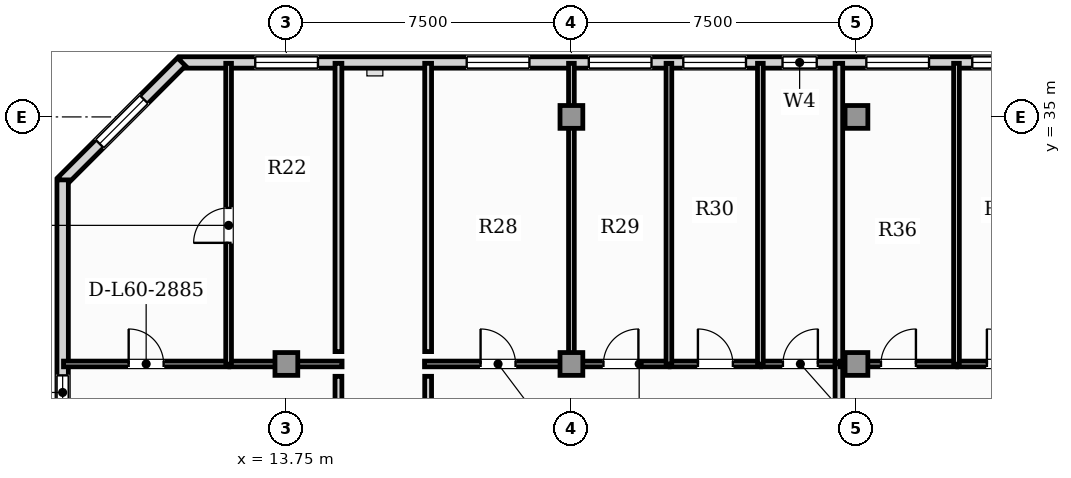
"""IFC4 building model, lengths in metres.
Left out: names, types, materials, properties, quantities, classifications, styles, units other than length and angle.
Written with IfcOpenShell. Run it as: python <this file> out.ifc"""

import sys

from ifc_helpers import new_model, si_unit, direction, frame, frame_2d, origin, origin_2d, place, context, subcontext, project, spatial, rectangle, extrude, element, fill, save


model = new_model("IFC4")
c1 = context("Model", 3, precision=1e-05, world=origin(), true_north=direction((0.0, 1.0)))
c2 = subcontext(c1, "Body", "Model", "MODEL_VIEW")
j1 = project(units=[si_unit("LENGTHUNIT", "METRE"), si_unit("PLANEANGLEUNIT", "RADIAN")], contexts=[c1])
p1 = place(None, origin())
s1 = spatial("IfcSite", under=j1, at=p1, CompositionType="ELEMENT")
p2 = place(p1, origin())
s2 = spatial("IfcBuilding", under=s1, at=p2, CompositionType="ELEMENT")
p3 = place(p2, frame((0.0, 0.0, 242.65)))
s3 = spatial("IfcBuildingStorey", under=s2, at=p3, CompositionType="ELEMENT", Elevation=242.65)
for number, where, z_axis, x_axis in (
    (1, (13.75, 28.5, 0.0), (0.0, 0.0, 1.0), (1.0, 0.0, 0.0)),
    (2, (21.25, 28.5, 0.0), (0.0, 0.0, 1.0), (1.0, 0.0, 0.0)),
    (3, (28.75, 28.5, 0.0), (0.0, 0.0, 1.0), (1.0, 0.0, 0.0)),
    (4, (21.25, 35.0, 0.0), (0.0, 0.0, 1.0), (1.0, 0.0, 0.0)),
    (5, (28.75, 35.0, 0.0), (0.0, 0.0, 1.0), (1.0, 0.0, 0.0)),
):
    element("IfcColumn", number, at=place(p3, frame(where, z_axis=z_axis, x_axis=x_axis)), inside=s3, PredefinedType="COLUMN", context=c2, shape_type="SweptSolid", body=[
        extrude(rectangle(XDim=0.6, YDim=0.6, at=origin_2d()), origin(), (0.0, 0.0, 1.0), 3.85),
    ])
p4 = place(p3, frame((46.547, 36.433, 0.0), z_axis=(0.0, 0.0, 1.0), x_axis=(-1.0, 0.0, 0.0)))
e6 = element("IfcWall", 6, at=p4, inside=s3, PredefinedType="SOLIDWALL", context=c2, shape_type="SweptSolid", body=[
    extrude(rectangle(XDim=35.593, YDim=0.3, at=frame_2d((17.797, 0.0))), origin(), (0.0, 0.0, 1.0), 3.5),
])
p5 = place(p4, frame((31.966, 0.0, 0.88)))
e7 = element("IfcOpeningElement", 7, at=p5, cuts=e6, PredefinedType="OPENING", context=c2, shape_type="SweptSolid", body=[
    extrude(rectangle(XDim=1.65, YDim=2.0, at=frame_2d((0.825, 1.0))), frame((0.0, 0.16, 0.0), z_axis=(0.0, -1.0, 0.0), x_axis=(1.0, 0.0, 0.0)), (0.0, 0.0, 1.0), 0.32),
])
p6 = place(p4, frame((26.402, 0.0, 0.88)))
e8 = element("IfcOpeningElement", 8, at=p6, cuts=e6, PredefinedType="OPENING", context=c2, shape_type="SweptSolid", body=[
    extrude(rectangle(XDim=1.65, YDim=2.0, at=frame_2d((0.825, 1.0))), frame((0.0, 0.16, 0.0), z_axis=(0.0, -1.0, 0.0), x_axis=(1.0, 0.0, 0.0)), (0.0, 0.0, 1.0), 0.32),
])
p7 = place(p4, frame((23.189, 0.0, 0.88)))
e9 = element("IfcOpeningElement", 9, at=p7, cuts=e6, PredefinedType="OPENING", context=c2, shape_type="SweptSolid", body=[
    extrude(rectangle(XDim=1.65, YDim=2.0, at=frame_2d((0.825, 1.0))), frame((0.0, 0.16, 0.0), z_axis=(0.0, -1.0, 0.0), x_axis=(1.0, 0.0, 0.0)), (0.0, 0.0, 1.0), 0.32),
])
p8 = place(p4, frame((20.703, 0.0, 0.88)))
e10 = element("IfcOpeningElement", 10, at=p8, cuts=e6, PredefinedType="OPENING", context=c2, shape_type="SweptSolid", body=[
    extrude(rectangle(XDim=1.65, YDim=2.0, at=frame_2d((0.825, 1.0))), frame((0.0, 0.16, 0.0), z_axis=(0.0, -1.0, 0.0), x_axis=(1.0, 0.0, 0.0)), (0.0, 0.0, 1.0), 0.32),
])
p9 = place(p4, frame((18.842, 0.0, 0.95)))
e11 = element("IfcOpeningElement", 11, at=p9, cuts=e6, PredefinedType="OPENING", context=c2, shape_type="SweptSolid", body=[
    extrude(rectangle(XDim=0.9, YDim=1.5, at=frame_2d((0.45, 0.75))), frame((0.0, 0.16, 0.0), z_axis=(0.0, -1.0, 0.0), x_axis=(1.0, 0.0, 0.0)), (0.0, 0.0, 1.0), 0.32),
])
p10 = place(p4, frame((15.887, 0.0, 0.88)))
e12 = element("IfcOpeningElement", 12, at=p10, cuts=e6, PredefinedType="OPENING", context=c2, shape_type="SweptSolid", body=[
    extrude(rectangle(XDim=1.65, YDim=2.0, at=frame_2d((0.825, 1.0))), frame((0.0, 0.16, 0.0), z_axis=(0.0, -1.0, 0.0), x_axis=(1.0, 0.0, 0.0)), (0.0, 0.0, 1.0), 0.32),
])
p11 = place(p4, frame((13.1, 0.0, 0.88)))
e13 = element("IfcOpeningElement", 13, at=p11, cuts=e6, PredefinedType="OPENING", context=c2, shape_type="SweptSolid", body=[
    extrude(rectangle(XDim=1.65, YDim=2.0, at=frame_2d((0.825, 1.0))), frame((0.0, 0.16, 0.0), z_axis=(0.0, -1.0, 0.0), x_axis=(1.0, 0.0, 0.0)), (0.0, 0.0, 1.0), 0.32),
])
p12 = place(p4, frame((10.666, 0.0, 0.88)))
e14 = element("IfcOpeningElement", 14, at=p12, cuts=e6, PredefinedType="OPENING", context=c2, shape_type="SweptSolid", body=[
    extrude(rectangle(XDim=1.65, YDim=2.0, at=frame_2d((0.825, 1.0))), frame((0.0, 0.16, 0.0), z_axis=(0.0, -1.0, 0.0), x_axis=(1.0, 0.0, 0.0)), (0.0, 0.0, 1.0), 0.32),
])
p13 = place(p4, frame((8.185, 0.0, 0.88)))
e15 = element("IfcOpeningElement", 15, at=p13, cuts=e6, PredefinedType="OPENING", context=c2, shape_type="SweptSolid", body=[
    extrude(rectangle(XDim=1.65, YDim=2.0, at=frame_2d((0.825, 1.0))), frame((0.0, 0.16, 0.0), z_axis=(0.0, -1.0, 0.0), x_axis=(1.0, 0.0, 0.0)), (0.0, 0.0, 1.0), 0.32),
])
p14 = place(p4, frame((5.405, 0.0, 0.88)))
e16 = element("IfcOpeningElement", 16, at=p14, cuts=e6, PredefinedType="OPENING", context=c2, shape_type="SweptSolid", body=[
    extrude(rectangle(XDim=1.65, YDim=2.0, at=frame_2d((0.825, 1.0))), frame((0.0, 0.16, 0.0), z_axis=(0.0, -1.0, 0.0), x_axis=(1.0, 0.0, 0.0)), (0.0, 0.0, 1.0), 0.32),
])
p15 = place(p4, frame((2.714, 0.0, 0.88)))
e17 = element("IfcOpeningElement", 17, at=p15, cuts=e6, PredefinedType="OPENING", context=c2, shape_type="SweptSolid", body=[
    extrude(rectangle(XDim=1.65, YDim=2.0, at=frame_2d((0.825, 1.0))), frame((0.0, 0.16, 0.0), z_axis=(0.0, -1.0, 0.0), x_axis=(1.0, 0.0, 0.0)), (0.0, 0.0, 1.0), 0.32),
])
p16 = place(p4, frame((0.78, 0.0, 0.95)))
e18 = element("IfcOpeningElement", 18, at=p16, cuts=e6, PredefinedType="OPENING", context=c2, shape_type="SweptSolid", body=[
    extrude(rectangle(XDim=0.9, YDim=1.5, at=frame_2d((0.45, 0.75))), frame((0.0, 0.16, 0.0), z_axis=(0.0, -1.0, 0.0), x_axis=(1.0, 0.0, 0.0)), (0.0, 0.0, 1.0), 0.32),
])
p17 = place(p3, frame((10.991, 36.449, 0.0), z_axis=(0.0, 0.0, 1.0), x_axis=(-0.707134240044, -0.707079321262, 0.0)))
e19 = element("IfcWall", 19, at=p17, inside=s3, PredefinedType="SOLIDWALL", context=c2, shape_type="SweptSolid", body=[
    extrude(rectangle(XDim=4.446, YDim=0.3, at=frame_2d((2.223, 0.0))), origin(), (0.0, 0.0, 1.0), 3.5),
])
p18 = place(p17, frame((1.398, 0.0, 0.88)))
e20 = element("IfcOpeningElement", 20, at=p18, cuts=e19, PredefinedType="OPENING", context=c2, shape_type="SweptSolid", body=[
    extrude(rectangle(XDim=1.65, YDim=2.0, at=frame_2d((0.825, 1.0))), frame((0.0, 0.16, 0.0), z_axis=(0.0, -1.0, 0.0), x_axis=(1.0, 0.0, 0.0)), (0.0, 0.0, 1.0), 0.32),
])
p19 = place(p3, frame((7.863, 33.343, 0.0), z_axis=(0.0, 0.0, 1.0), x_axis=(0.0, -1.0, 0.0)))
e21 = element("IfcWall", 21, at=p19, inside=s3, PredefinedType="SOLIDWALL", context=c2, shape_type="SweptSolid", body=[
    extrude(rectangle(XDim=30.103, YDim=0.3, at=frame_2d((15.052, 0.0))), origin(), (0.0, 0.0, 1.0), 3.5),
])
p20 = place(p19, frame((24.044, 0.0, 0.85)))
e22 = element("IfcOpeningElement", 22, at=p20, cuts=e21, PredefinedType="OPENING", context=c2, shape_type="SweptSolid", body=[
    extrude(rectangle(XDim=2.4, YDim=2.0, at=frame_2d((1.2, 1.0))), frame((0.0, 0.16, 0.0), z_axis=(0.0, -1.0, 0.0), x_axis=(1.0, 0.0, 0.0)), (0.0, 0.0, 1.0), 0.32),
])
p21 = place(p19, frame((5.143, 0.0, 0.95)))
e23 = element("IfcOpeningElement", 23, at=p21, cuts=e21, PredefinedType="OPENING", context=c2, shape_type="SweptSolid", body=[
    extrude(rectangle(XDim=0.9, YDim=1.5, at=frame_2d((0.45, 0.75))), frame((0.0, 0.16, 0.0), z_axis=(0.0, -1.0, 0.0), x_axis=(1.0, 0.0, 0.0)), (0.0, 0.0, 1.0), 0.32),
])
p22 = place(p19, frame((10.185, 0.0, 0.88)))
e24 = element("IfcOpeningElement", 24, at=p22, cuts=e21, PredefinedType="OPENING", context=c2, shape_type="SweptSolid", body=[
    extrude(rectangle(XDim=1.65, YDim=2.0, at=frame_2d((0.825, 1.0))), frame((0.0, 0.16, 0.0), z_axis=(0.0, -1.0, 0.0), x_axis=(1.0, 0.0, 0.0)), (0.0, 0.0, 1.0), 0.32),
])
p23 = place(p3, frame((7.886, 28.5, 0.0), z_axis=(0.0, 0.0, 1.0), x_axis=(1.0, 0.0, 0.0)))
e25 = element("IfcWall", 25, at=p23, inside=s3, PredefinedType="PARTITIONING", context=c2, shape_type="SweptSolid", body=[
    extrude(rectangle(XDim=4.349, YDim=0.15, at=frame_2d((2.175, 0.0))), origin(), (0.0, 0.0, 1.0), 3.5),
])
p24 = place(p23, frame((1.715, 0.0, 0.0)))
e26 = element("IfcOpeningElement", 26, at=p24, cuts=e25, PredefinedType="OPENING", context=c2, shape_type="SweptSolid", body=[
    extrude(rectangle(XDim=0.92, YDim=2.1, at=frame_2d((0.46, 1.05))), frame((0.0, 0.085, 0.0), z_axis=(0.0, -1.0, 0.0), x_axis=(1.0, 0.0, 0.0)), (0.0, 0.0, 1.0), 0.17),
])
p25 = place(p3, frame((12.265, 28.5, 0.0), z_axis=(0.0, 0.0, 1.0), x_axis=(1.0, 0.0, 0.0)))
e27 = element("IfcWall", 27, at=p25, inside=s3, PredefinedType="PARTITIONING", context=c2, shape_type="SweptSolid", body=[
    extrude(rectangle(XDim=2.95, YDim=0.15, at=frame_2d((1.475, 0.0))), origin(), (0.0, 0.0, 1.0), 2.956),
])
p26 = place(p3, frame((12.23, 28.495, 0.0), z_axis=(0.0, 0.0, 1.0), x_axis=(0.0, 1.0, 0.0)))
e28 = element("IfcWall", 28, at=p26, inside=s3, PredefinedType="PARTITIONING", context=c2, shape_type="SweptSolid", body=[
    extrude(rectangle(XDim=7.916, YDim=0.15, at=frame_2d((3.958, 0.0))), origin(), (0.0, 0.0, 1.0), 3.5),
])
p27 = place(p26, frame((3.191, 0.0, 0.0)))
e29 = element("IfcOpeningElement", 29, at=p27, cuts=e28, PredefinedType="OPENING", context=c2, shape_type="SweptSolid", body=[
    extrude(rectangle(XDim=0.92, YDim=2.1, at=frame_2d((0.46, 1.05))), frame((0.0, 0.085, 0.0), z_axis=(0.0, -1.0, 0.0), x_axis=(1.0, 0.0, 0.0)), (0.0, 0.0, 1.0), 0.17),
])
p28 = place(p3, frame((17.385, 28.5, 0.0), z_axis=(0.0, 0.0, 1.0), x_axis=(1.0, 0.0, 0.0)))
e30 = element("IfcWall", 30, at=p28, inside=s3, PredefinedType="PARTITIONING", context=c2, shape_type="SweptSolid", body=[
    extrude(rectangle(XDim=3.87, YDim=0.15, at=frame_2d((1.935, 0.0))), origin(), (0.0, 0.0, 1.0), 2.956),
])
p29 = place(p28, frame((1.475, 0.0, 0.0)))
e31 = element("IfcOpeningElement", 31, at=p29, cuts=e30, PredefinedType="OPENING", context=c2, shape_type="SweptSolid", body=[
    extrude(rectangle(XDim=0.92, YDim=2.1, at=frame_2d((0.46, 1.05))), frame((0.0, 0.085, 0.0), z_axis=(0.0, -1.0, 0.0), x_axis=(1.0, 0.0, 0.0)), (0.0, 0.0, 1.0), 0.17),
])
p30 = place(p3, frame((21.285, 28.5, 0.0), z_axis=(0.0, 0.0, 1.0), x_axis=(1.0, 0.0, 0.0)))
e32 = element("IfcWall", 32, at=p30, inside=s3, PredefinedType="PARTITIONING", context=c2, shape_type="SweptSolid", body=[
    extrude(rectangle(XDim=2.536, YDim=0.15, at=frame_2d((1.268, 0.0))), origin(), (0.0, 0.0, 1.0), 2.956),
])
p31 = place(p30, frame((0.808, 0.0, 0.0)))
e33 = element("IfcOpeningElement", 33, at=p31, cuts=e32, PredefinedType="OPENING", context=c2, shape_type="SweptSolid", body=[
    extrude(rectangle(XDim=0.92, YDim=2.1, at=frame_2d((0.46, 1.05))), frame((0.0, 0.085, 0.0), z_axis=(0.0, -1.0, 0.0), x_axis=(1.0, 0.0, 0.0)), (0.0, 0.0, 1.0), 0.17),
])
p32 = place(p3, frame((23.851, 28.5, 0.0), z_axis=(0.0, 0.0, 1.0), x_axis=(1.0, 0.0, 0.0)))
e34 = element("IfcWall", 34, at=p32, inside=s3, PredefinedType="PARTITIONING", context=c2, shape_type="SweptSolid", body=[
    extrude(rectangle(XDim=2.376, YDim=0.15, at=frame_2d((1.188, 0.0))), origin(), (0.0, 0.0, 1.0), 2.956),
])
p33 = place(p32, frame((0.728, 0.0, 0.0)))
e35 = element("IfcOpeningElement", 35, at=p33, cuts=e34, PredefinedType="OPENING", context=c2, shape_type="SweptSolid", body=[
    extrude(rectangle(XDim=0.92, YDim=2.1, at=frame_2d((0.46, 1.05))), frame((0.0, 0.085, 0.0), z_axis=(0.0, -1.0, 0.0), x_axis=(1.0, 0.0, 0.0)), (0.0, 0.0, 1.0), 0.17),
])
p34 = place(p3, frame((26.257, 28.5, 0.0), z_axis=(0.0, 0.0, 1.0), x_axis=(1.0, 0.0, 0.0)))
e36 = element("IfcWall", 36, at=p34, inside=s3, PredefinedType="PARTITIONING", context=c2, shape_type="SweptSolid", body=[
    extrude(rectangle(XDim=2.036, YDim=0.15, at=frame_2d((1.018, 0.0))), origin(), (0.0, 0.0, 1.0), 2.956),
])
p35 = place(p34, frame((0.558, 0.0, 0.0)))
e37 = element("IfcOpeningElement", 37, at=p35, cuts=e36, PredefinedType="OPENING", context=c2, shape_type="SweptSolid", body=[
    extrude(rectangle(XDim=0.92, YDim=2.1, at=frame_2d((0.46, 1.05))), frame((0.0, 0.085, 0.0), z_axis=(0.0, -1.0, 0.0), x_axis=(1.0, 0.0, 0.0)), (0.0, 0.0, 1.0), 0.17),
])
p36 = place(p3, frame((28.288, 26.995, 0.0), z_axis=(0.0, 0.0, 1.0), x_axis=(0.0, 1.0, 0.0)))
e38 = element("IfcWall", 38, at=p36, inside=s3, PredefinedType="PARTITIONING", context=c2, shape_type="SweptSolid", body=[
    extrude(rectangle(XDim=1.51, YDim=0.2, at=frame_2d((0.755, 0.0))), origin(), (0.0, 0.0, 1.0), 3.5),
])
for number, where, z_axis, x_axis in (
    (39, (21.25, 28.495, 0.0), (0.0, 0.0, 1.0), (0.0, 1.0, 0.0)),
    (40, (23.815, 28.495, 0.0), (0.0, 0.0, 1.0), (0.0, 1.0, 0.0)),
    (41, (26.222, 28.495, 0.0), (0.0, 0.0, 1.0), (0.0, 1.0, 0.0)),
):
    element("IfcWall", number, at=place(p3, frame(where, z_axis=z_axis, x_axis=x_axis)), inside=s3, PredefinedType="PARTITIONING", context=c2, shape_type="SweptSolid", body=[
        extrude(rectangle(XDim=7.916, YDim=0.15, at=frame_2d((3.958, 0.0))), origin(), (0.0, 0.0, 1.0), 3.5),
    ])
p37 = place(p3, frame((28.288, 28.535, 0.0), z_axis=(0.0, 0.0, 1.0), x_axis=(0.0, 1.0, 0.0)))
e42 = element("IfcWall", 42, at=p37, inside=s3, PredefinedType="PARTITIONING", context=c2, shape_type="SweptSolid", body=[
    extrude(rectangle(XDim=7.876, YDim=0.2, at=frame_2d((3.938, 0.0))), origin(), (0.0, 0.0, 1.0), 3.5),
])
p38 = place(p3, frame((28.323, 28.5, 0.0), z_axis=(0.0, 0.0, 1.0), x_axis=(1.0, 0.0, 0.0)))
e43 = element("IfcWall", 43, at=p38, inside=s3, PredefinedType="PARTITIONING", context=c2, shape_type="SweptSolid", body=[
    extrude(rectangle(XDim=3.064, YDim=0.15, at=frame_2d((1.532, 0.0))), origin(), (0.0, 0.0, 1.0), 2.956),
])
p39 = place(p38, frame((1.072, 0.0, 0.0)))
e44 = element("IfcOpeningElement", 44, at=p39, cuts=e43, PredefinedType="OPENING", context=c2, shape_type="SweptSolid", body=[
    extrude(rectangle(XDim=0.92, YDim=2.1, at=frame_2d((0.46, 1.05))), frame((0.0, 0.085, 0.0), z_axis=(0.0, -1.0, 0.0), x_axis=(1.0, 0.0, 0.0)), (0.0, 0.0, 1.0), 0.17),
])
p40 = place(p3, frame((31.417, 28.5, 0.0), z_axis=(0.0, 0.0, 1.0), x_axis=(1.0, 0.0, 0.0)))
e45 = element("IfcWall", 45, at=p40, inside=s3, PredefinedType="PARTITIONING", context=c2, shape_type="SweptSolid", body=[
    extrude(rectangle(XDim=2.45, YDim=0.15, at=frame_2d((1.225, 0.0))), origin(), (0.0, 0.0, 1.0), 2.956),
])
p41 = place(p40, frame((0.765, 0.0, 0.0)))
e46 = element("IfcOpeningElement", 46, at=p41, cuts=e45, PredefinedType="OPENING", context=c2, shape_type="SweptSolid", body=[
    extrude(rectangle(XDim=0.92, YDim=2.1, at=frame_2d((0.46, 1.05))), frame((0.0, 0.085, 0.0), z_axis=(0.0, -1.0, 0.0), x_axis=(1.0, 0.0, 0.0)), (0.0, 0.0, 1.0), 0.17),
])
p42 = place(p3, frame((31.382, 28.495, 0.0), z_axis=(0.0, 0.0, 1.0), x_axis=(0.0, 1.0, 0.0)))
e47 = element("IfcWall", 47, at=p42, inside=s3, PredefinedType="PARTITIONING", context=c2, shape_type="SweptSolid", body=[
    extrude(rectangle(XDim=7.916, YDim=0.15, at=frame_2d((3.958, 0.0))), origin(), (0.0, 0.0, 1.0), 3.5),
])
p43 = place(p3, frame((15.12, 28.175, 0.0), z_axis=(0.0, 0.0, 1.0), x_axis=(0.0, -1.0, 0.0)))
e48 = element("IfcWall", 48, at=p43, inside=s3, PredefinedType="PARTITIONING", context=c2, shape_type="SweptSolid", body=[
    extrude(rectangle(XDim=0.85, YDim=0.18, at=frame_2d((0.425, 0.0))), origin(), (0.0, 0.0, 1.0), 3.5),
])
p44 = place(p3, frame((15.12, 36.411, 0.0), z_axis=(0.0, 0.0, 1.0), x_axis=(0.0, -1.0, 0.0)))
e49 = element("IfcWall", 49, at=p44, inside=s3, PredefinedType="PARTITIONING", context=c2, shape_type="SweptSolid", body=[
    extrude(rectangle(XDim=7.586, YDim=0.18, at=frame_2d((3.793, 0.0))), origin(), (0.0, 0.0, 1.0), 3.5),
])
p45 = place(p3, frame((17.48, 27.325, 0.0), z_axis=(0.0, 0.0, 1.0), x_axis=(0.0, 1.0, 0.0)))
e50 = element("IfcWall", 50, at=p45, inside=s3, PredefinedType="PARTITIONING", context=c2, shape_type="SweptSolid", body=[
    extrude(rectangle(XDim=0.85, YDim=0.18, at=frame_2d((0.425, 0.0))), origin(), (0.0, 0.0, 1.0), 3.5),
])
p46 = place(p3, frame((17.48, 28.825, 0.0), z_axis=(0.0, 0.0, 1.0), x_axis=(0.0, 1.0, 0.0)))
e51 = element("IfcWall", 51, at=p46, inside=s3, PredefinedType="PARTITIONING", context=c2, shape_type="SweptSolid", body=[
    extrude(rectangle(XDim=7.586, YDim=0.18, at=frame_2d((3.793, 0.0))), origin(), (0.0, 0.0, 1.0), 3.5),
])
p47 = place(p21, origin())
e52 = element("IfcWindow", 52, at=p47, inside=s3, PartitioningType="SINGLE_PANEL", PredefinedType="WINDOW", context=c2, shape_type="SweptSolid", body=[
    extrude(rectangle(XDim=0.9, YDim=1.5, at=frame_2d((0.45, 0.75))), frame((0.0, 0.03, 0.0), z_axis=(0.0, -1.0, 0.0), x_axis=(1.0, 0.0, 0.0)), (0.0, 0.0, 1.0), 0.06),
])
fill(e23, e52)
p48 = place(p18, origin())
e53 = element("IfcWindow", 53, at=p48, inside=s3, PartitioningType="SINGLE_PANEL", PredefinedType="WINDOW", context=c2, shape_type="SweptSolid", body=[
    extrude(rectangle(XDim=1.65, YDim=2.0, at=frame_2d((0.825, 1.0))), frame((0.0, 0.03, 0.0), z_axis=(0.0, -1.0, 0.0), x_axis=(1.0, 0.0, 0.0)), (0.0, 0.0, 1.0), 0.06),
])
fill(e20, e53)
p49 = place(p5, origin())
e54 = element("IfcWindow", 54, at=p49, inside=s3, PartitioningType="SINGLE_PANEL", PredefinedType="WINDOW", context=c2, shape_type="SweptSolid", body=[
    extrude(rectangle(XDim=1.65, YDim=2.0, at=frame_2d((0.825, 1.0))), frame((0.0, 0.03, 0.0), z_axis=(0.0, -1.0, 0.0), x_axis=(1.0, 0.0, 0.0)), (0.0, 0.0, 1.0), 0.06),
])
fill(e7, e54)
p50 = place(p6, origin())
e55 = element("IfcWindow", 55, at=p50, inside=s3, PartitioningType="SINGLE_PANEL", PredefinedType="WINDOW", context=c2, shape_type="SweptSolid", body=[
    extrude(rectangle(XDim=1.65, YDim=2.0, at=frame_2d((0.825, 1.0))), frame((0.0, 0.03, 0.0), z_axis=(0.0, -1.0, 0.0), x_axis=(1.0, 0.0, 0.0)), (0.0, 0.0, 1.0), 0.06),
])
fill(e8, e55)
p51 = place(p7, origin())
e56 = element("IfcWindow", 56, at=p51, inside=s3, PartitioningType="SINGLE_PANEL", PredefinedType="WINDOW", context=c2, shape_type="SweptSolid", body=[
    extrude(rectangle(XDim=1.65, YDim=2.0, at=frame_2d((0.825, 1.0))), frame((0.0, 0.03, 0.0), z_axis=(0.0, -1.0, 0.0), x_axis=(1.0, 0.0, 0.0)), (0.0, 0.0, 1.0), 0.06),
])
fill(e9, e56)
p52 = place(p8, origin())
e57 = element("IfcWindow", 57, at=p52, inside=s3, PartitioningType="SINGLE_PANEL", PredefinedType="WINDOW", context=c2, shape_type="SweptSolid", body=[
    extrude(rectangle(XDim=1.65, YDim=2.0, at=frame_2d((0.825, 1.0))), frame((0.0, 0.03, 0.0), z_axis=(0.0, -1.0, 0.0), x_axis=(1.0, 0.0, 0.0)), (0.0, 0.0, 1.0), 0.06),
])
fill(e10, e57)
p53 = place(p9, origin())
e58 = element("IfcWindow", 58, at=p53, inside=s3, PartitioningType="SINGLE_PANEL", PredefinedType="WINDOW", context=c2, shape_type="SweptSolid", body=[
    extrude(rectangle(XDim=0.9, YDim=1.5, at=frame_2d((0.45, 0.75))), frame((0.0, 0.03, 0.0), z_axis=(0.0, -1.0, 0.0), x_axis=(1.0, 0.0, 0.0)), (0.0, 0.0, 1.0), 0.06),
])
fill(e11, e58)
p54 = place(p10, origin())
e59 = element("IfcWindow", 59, at=p54, inside=s3, PartitioningType="SINGLE_PANEL", PredefinedType="WINDOW", context=c2, shape_type="SweptSolid", body=[
    extrude(rectangle(XDim=1.65, YDim=2.0, at=frame_2d((0.825, 1.0))), frame((0.0, 0.03, 0.0), z_axis=(0.0, -1.0, 0.0), x_axis=(1.0, 0.0, 0.0)), (0.0, 0.0, 1.0), 0.06),
])
fill(e12, e59)
p55 = place(p11, origin())
e60 = element("IfcWindow", 60, at=p55, inside=s3, PartitioningType="SINGLE_PANEL", PredefinedType="WINDOW", context=c2, shape_type="SweptSolid", body=[
    extrude(rectangle(XDim=1.65, YDim=2.0, at=frame_2d((0.825, 1.0))), frame((0.0, 0.03, 0.0), z_axis=(0.0, -1.0, 0.0), x_axis=(1.0, 0.0, 0.0)), (0.0, 0.0, 1.0), 0.06),
])
fill(e13, e60)
p56 = place(p24, origin())
e61 = element("IfcDoor", 61, at=p56, inside=s3, OperationType="SINGLE_SWING_LEFT", PredefinedType="DOOR", context=c2, shape_type="SweptSolid", body=[
    extrude(rectangle(XDim=0.92, YDim=2.1, at=frame_2d((0.46, 1.05))), frame((0.0, 0.025, 0.0), z_axis=(0.0, -1.0, 0.0), x_axis=(1.0, 0.0, 0.0)), (0.0, 0.0, 1.0), 0.05),
])
fill(e26, e61)
p57 = place(p29, origin())
e62 = element("IfcDoor", 62, at=p57, inside=s3, OperationType="SINGLE_SWING_LEFT", PredefinedType="DOOR", context=c2, shape_type="SweptSolid", body=[
    extrude(rectangle(XDim=0.92, YDim=2.1, at=frame_2d((0.46, 1.05))), frame((0.0, 0.025, 0.0), z_axis=(0.0, -1.0, 0.0), x_axis=(1.0, 0.0, 0.0)), (0.0, 0.0, 1.0), 0.05),
])
fill(e31, e62)
p58 = place(p31, origin())
e63 = element("IfcDoor", 63, at=p58, inside=s3, OperationType="SINGLE_SWING_RIGHT", PredefinedType="DOOR", context=c2, shape_type="SweptSolid", body=[
    extrude(rectangle(XDim=0.92, YDim=2.1, at=frame_2d((0.46, 1.05))), frame((0.0, 0.025, 0.0), z_axis=(0.0, -1.0, 0.0), x_axis=(1.0, 0.0, 0.0)), (0.0, 0.0, 1.0), 0.05),
])
fill(e33, e63)
p59 = place(p33, origin())
e64 = element("IfcDoor", 64, at=p59, inside=s3, OperationType="SINGLE_SWING_LEFT", PredefinedType="DOOR", context=c2, shape_type="SweptSolid", body=[
    extrude(rectangle(XDim=0.92, YDim=2.1, at=frame_2d((0.46, 1.05))), frame((0.0, 0.025, 0.0), z_axis=(0.0, -1.0, 0.0), x_axis=(1.0, 0.0, 0.0)), (0.0, 0.0, 1.0), 0.05),
])
fill(e35, e64)
p60 = place(p35, origin())
e65 = element("IfcDoor", 65, at=p60, inside=s3, OperationType="SINGLE_SWING_RIGHT", PredefinedType="DOOR", context=c2, shape_type="SweptSolid", body=[
    extrude(rectangle(XDim=0.92, YDim=2.1, at=frame_2d((0.46, 1.05))), frame((0.0, 0.025, 0.0), z_axis=(0.0, -1.0, 0.0), x_axis=(1.0, 0.0, 0.0)), (0.0, 0.0, 1.0), 0.05),
])
fill(e37, e65)
p61 = place(p39, origin())
e66 = element("IfcDoor", 66, at=p61, inside=s3, OperationType="SINGLE_SWING_RIGHT", PredefinedType="DOOR", context=c2, shape_type="SweptSolid", body=[
    extrude(rectangle(XDim=0.92, YDim=2.1, at=frame_2d((0.46, 1.05))), frame((0.0, 0.025, 0.0), z_axis=(0.0, -1.0, 0.0), x_axis=(1.0, 0.0, 0.0)), (0.0, 0.0, 1.0), 0.05),
])
fill(e44, e66)
p62 = place(p41, origin())
e67 = element("IfcDoor", 67, at=p62, inside=s3, OperationType="SINGLE_SWING_LEFT", PredefinedType="DOOR", context=c2, shape_type="SweptSolid", body=[
    extrude(rectangle(XDim=0.92, YDim=2.1, at=frame_2d((0.46, 1.05))), frame((0.0, 0.025, 0.0), z_axis=(0.0, -1.0, 0.0), x_axis=(1.0, 0.0, 0.0)), (0.0, 0.0, 1.0), 0.05),
])
fill(e46, e67)
p63 = place(p27, origin())
e68 = element("IfcDoor", 68, at=p63, inside=s3, OperationType="SINGLE_SWING_LEFT", PredefinedType="DOOR", context=c2, shape_type="SweptSolid", body=[
    extrude(rectangle(XDim=0.92, YDim=2.1, at=frame_2d((0.46, 1.05))), frame((0.0, 0.025, 0.0), z_axis=(0.0, -1.0, 0.0), x_axis=(1.0, 0.0, 0.0)), (0.0, 0.0, 1.0), 0.05),
])
fill(e29, e68)
save(model, sys.argv[1])
